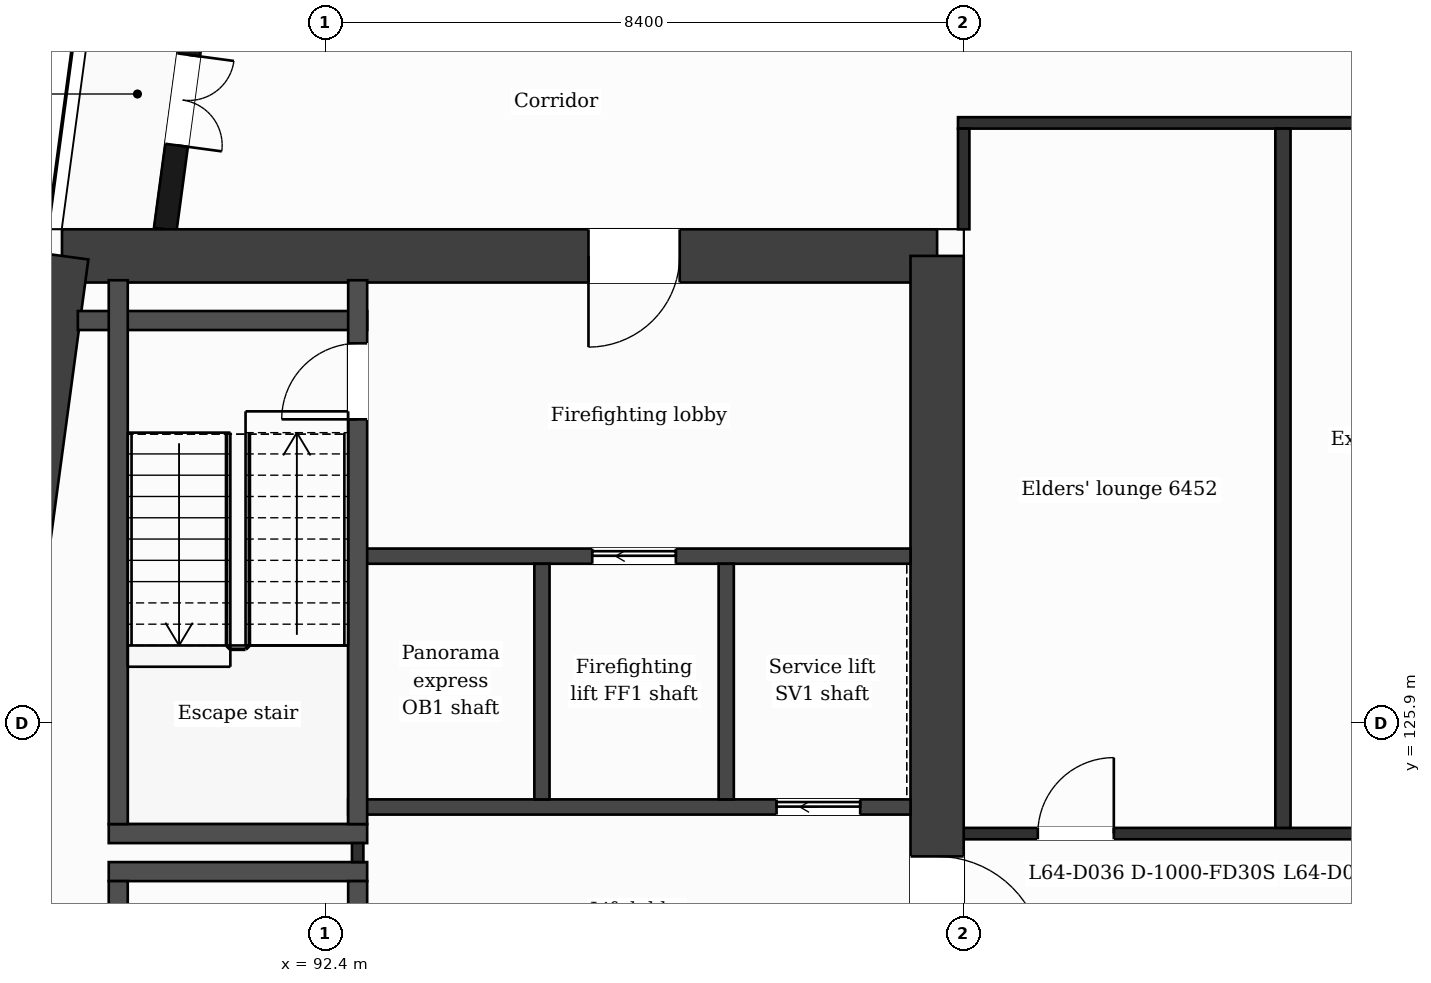
"""IFC4 building model, lengths in metres.
Left out: names, types, materials, properties, quantities, classifications, styles, units other than length and angle.
Written with IfcOpenShell. Run it as: python <this file> out.ifc"""

import sys

from ifc_helpers import new_model, si_unit, direction, frame, frame_2d, origin, place, context, subcontext, project, spatial, rectangle, extrude, element, fill, save


model = new_model("IFC4")
c1 = context("Model", 3, precision=1e-05, world=origin(), true_north=direction((0.0, 1.0)))
c2 = subcontext(c1, "Body", "Model", "MODEL_VIEW")
j1 = project(units=[si_unit("LENGTHUNIT", "METRE"), si_unit("PLANEANGLEUNIT", "RADIAN")], contexts=[c1])
p1 = place(None, origin())
s1 = spatial("IfcSite", under=j1, at=p1, CompositionType="ELEMENT")
p2 = place(p1, origin())
s2 = spatial("IfcBuilding", under=s1, at=p2, CompositionType="ELEMENT")
p3 = place(p2, frame((0.0, 0.0, 266.4)))
s3 = spatial("IfcBuildingStorey", under=s2, at=p3, CompositionType="ELEMENT", Elevation=266.4)
p4 = place(p3, frame((88.937, 132.05, 0.0), z_axis=(0.0, 0.0, 1.0), x_axis=(1.0, 0.0, 0.0)))
e1 = element("IfcWall", 1, at=p4, inside=s3, PredefinedType="SHEAR", context=c2, shape_type="SweptSolid", body=[
    extrude(rectangle(XDim=11.513, YDim=0.7, at=frame_2d((5.757, 0.0))), origin(), (0.0, 0.0, 1.0), 3.7),
])
p5 = place(p4, frame((6.927, 0.0, 0.0)))
e2 = element("IfcOpeningElement", 2, at=p5, cuts=e1, PredefinedType="OPENING", context=c2, shape_type="SweptSolid", body=[
    extrude(rectangle(XDim=1.2, YDim=2.1, at=frame_2d((0.6, 1.05))), frame((0.0, 0.36, 0.0), z_axis=(0.0, -1.0, 0.0), x_axis=(1.0, 0.0, 0.0)), (0.0, 0.0, 1.0), 0.72),
])
p6 = place(p3, frame((100.45, 132.05, 0.0), z_axis=(0.0, 0.0, 1.0), x_axis=(0.0, -1.0, 0.0)))
e3 = element("IfcWall", 3, at=p6, inside=s3, PredefinedType="SHEAR", context=c2, shape_type="SweptSolid", body=[
    extrude(rectangle(XDim=21.3, YDim=0.7, at=frame_2d((10.65, 0.0))), origin(), (0.0, 0.0, 1.0), 3.7),
])
p7 = place(p6, frame((7.9, 0.0, 0.0)))
e4 = element("IfcOpeningElement", 4, at=p7, cuts=e3, PredefinedType="OPENING", context=c2, shape_type="SweptSolid", body=[
    extrude(rectangle(XDim=1.4, YDim=2.1, at=frame_2d((0.7, 1.05))), frame((0.0, 0.36, 0.0), z_axis=(0.0, -1.0, 0.0), x_axis=(1.0, 0.0, 0.0)), (0.0, 0.0, 1.0), 0.72),
])
p8 = place(p3, frame((86.07, 110.75, 0.0), z_axis=(0.0, 0.0, 1.0), x_axis=(0.133406218907, 0.991061441464, 0.0)))
e5 = element("IfcWall", 5, at=p8, inside=s3, PredefinedType="SHEAR", context=c2, shape_type="SweptSolid", body=[
    extrude(rectangle(XDim=21.492, YDim=0.7, at=frame_2d((10.746, 0.0))), origin(), (0.0, 0.0, 1.0), 3.7),
])
p9 = place(p3, frame((91.177, 138.95, 0.0), z_axis=(0.0, 0.0, 1.0), x_axis=(-0.133426664613, -0.991058689065, 0.0)))
e6 = element("IfcWall", 6, at=p9, inside=s3, PredefinedType="SOLIDWALL", context=c2, shape_type="SweptSolid", body=[
    extrude(rectangle(XDim=6.609, YDim=0.3, at=frame_2d((3.305, 0.0))), origin(), (0.0, 0.0, 1.0), 3.38),
])
p10 = place(p9, frame((1.039, 0.0, 0.9)))
e7 = element("IfcOpeningElement", 7, at=p10, cuts=e6, PredefinedType="OPENING", context=c2, shape_type="SweptSolid", body=[
    extrude(rectangle(XDim=1.2, YDim=2.1, at=frame_2d((0.6, 1.05))), frame((0.0, 0.16, 0.0), z_axis=(0.0, -1.0, 0.0), x_axis=(1.0, 0.0, 0.0)), (0.0, 0.0, 1.0), 0.32),
])
p11 = place(p9, frame((4.294, 0.0, 0.0)))
e8 = element("IfcOpeningElement", 8, at=p11, cuts=e6, PredefinedType="OPENING", context=c2, shape_type="SweptSolid", body=[
    extrude(rectangle(XDim=1.2, YDim=2.4, at=frame_2d((0.6, 1.2))), frame((0.0, 0.16, 0.0), z_axis=(0.0, -1.0, 0.0), x_axis=(1.0, 0.0, 0.0)), (0.0, 0.0, 1.0), 0.32),
])
for number, where, z_axis, x_axis in (
    (9, (89.552, 123.95, 0.0), (0.0, 0.0, 1.0), (1.0, 0.0, 0.0)),
    (10, (89.552, 124.45, 0.0), (0.0, 0.0, 1.0), (1.0, 0.0, 0.0)),
):
    element("IfcWall", number, at=place(p3, frame(where, z_axis=z_axis, x_axis=x_axis)), inside=s3, PredefinedType="PARTITIONING", context=c2, shape_type="SweptSolid", body=[
        extrude(rectangle(XDim=3.4, YDim=0.25, at=frame_2d((1.7, 0.0))), origin(), (0.0, 0.0, 1.0), 3.38),
    ])
p12 = place(p3, frame((100.8, 124.45, 0.0), z_axis=(0.0, 0.0, 1.0), x_axis=(1.0, 0.0, 0.0)))
e11 = element("IfcWall", 11, at=p12, inside=s3, PredefinedType="PARTITIONING", context=c2, shape_type="SweptSolid", body=[
    extrude(rectangle(XDim=25.2, YDim=0.15, at=frame_2d((12.6, 0.0))), origin(), (0.0, 0.0, 1.0), 3.38),
])
p13 = place(p12, frame((0.975, 0.0, 0.0)))
e12 = element("IfcOpeningElement", 12, at=p13, cuts=e11, PredefinedType="OPENING", context=c2, shape_type="SweptSolid", body=[
    extrude(rectangle(XDim=1.0, YDim=2.1, at=frame_2d((0.5, 1.05))), frame((0.0, 0.085, 0.0), z_axis=(0.0, -1.0, 0.0), x_axis=(1.0, 0.0, 0.0)), (0.0, 0.0, 1.0), 0.17),
])
p14 = place(p12, frame((5.175, 0.0, 0.0)))
e13 = element("IfcOpeningElement", 13, at=p14, cuts=e11, PredefinedType="OPENING", context=c2, shape_type="SweptSolid", body=[
    extrude(rectangle(XDim=1.0, YDim=2.1, at=frame_2d((0.5, 1.05))), frame((0.0, 0.085, 0.0), z_axis=(0.0, -1.0, 0.0), x_axis=(1.0, 0.0, 0.0)), (0.0, 0.0, 1.0), 0.17),
])
p15 = place(p12, frame((13.775, 0.0, 0.0)))
e14 = element("IfcOpeningElement", 14, at=p15, cuts=e11, PredefinedType="OPENING", context=c2, shape_type="SweptSolid", body=[
    extrude(rectangle(XDim=1.0, YDim=2.1, at=frame_2d((0.5, 1.05))), frame((0.0, 0.085, 0.0), z_axis=(0.0, -1.0, 0.0), x_axis=(1.0, 0.0, 0.0)), (0.0, 0.0, 1.0), 0.17),
])
p16 = place(p12, frame((17.67, 0.0, 0.0)))
e15 = element("IfcOpeningElement", 15, at=p16, cuts=e11, PredefinedType="OPENING", context=c2, shape_type="SweptSolid", body=[
    extrude(rectangle(XDim=1.0, YDim=2.1, at=frame_2d((0.5, 1.05))), frame((0.0, 0.085, 0.0), z_axis=(0.0, -1.0, 0.0), x_axis=(1.0, 0.0, 0.0)), (0.0, 0.0, 1.0), 0.17),
])
p17 = place(p12, frame((23.225, 0.0, 0.0)))
e16 = element("IfcOpeningElement", 16, at=p17, cuts=e11, PredefinedType="OPENING", context=c2, shape_type="SweptSolid", body=[
    extrude(rectangle(XDim=1.0, YDim=2.1, at=frame_2d((0.5, 1.05))), frame((0.0, 0.085, 0.0), z_axis=(0.0, -1.0, 0.0), x_axis=(1.0, 0.0, 0.0)), (0.0, 0.0, 1.0), 0.17),
])
p18 = place(p3, frame((92.702, 124.8, 0.0), z_axis=(0.0, 0.0, 1.0), x_axis=(1.0, 0.0, 0.0)))
e17 = element("IfcWall", 17, at=p18, inside=s3, PredefinedType="PARTITIONING", context=c2, shape_type="SweptSolid", body=[
    extrude(rectangle(XDim=7.398, YDim=0.2, at=frame_2d((3.699, 0.0))), origin(), (0.0, 0.0, 1.0), 3.38),
])
p19 = place(p18, frame((5.636, 0.0, 0.0)))
e18 = element("IfcOpeningElement", 18, at=p19, cuts=e17, PredefinedType="OPENING", context=c2, shape_type="SweptSolid", body=[
    extrude(rectangle(XDim=1.1, YDim=2.1, at=frame_2d((0.55, 1.05))), frame((0.0, 0.11, 0.0), z_axis=(0.0, -1.0, 0.0), x_axis=(1.0, 0.0, 0.0)), (0.0, 0.0, 1.0), 0.22),
])
p20 = place(p3, frame((92.827, 128.1, 0.0), z_axis=(0.0, 0.0, 1.0), x_axis=(1.0, 0.0, 0.0)))
e19 = element("IfcWall", 19, at=p20, inside=s3, PredefinedType="PARTITIONING", context=c2, shape_type="SweptSolid", body=[
    extrude(rectangle(XDim=7.273, YDim=0.2, at=frame_2d((3.637, 0.0))), origin(), (0.0, 0.0, 1.0), 3.38),
])
p21 = place(p20, frame((3.086, 0.0, 0.0)))
e20 = element("IfcOpeningElement", 20, at=p21, cuts=e19, PredefinedType="OPENING", context=c2, shape_type="SweptSolid", body=[
    extrude(rectangle(XDim=1.1, YDim=2.1, at=frame_2d((0.55, 1.05))), frame((0.0, 0.11, 0.0), z_axis=(0.0, -1.0, 0.0), x_axis=(1.0, 0.0, 0.0)), (0.0, 0.0, 1.0), 0.22),
])
p22 = place(p3, frame((89.146, 131.2, 0.0), z_axis=(0.0, 0.0, 1.0), x_axis=(1.0, 0.0, 0.0)))
e21 = element("IfcWall", 21, at=p22, inside=s3, PredefinedType="PARTITIONING", context=c2, shape_type="SweptSolid", body=[
    extrude(rectangle(XDim=3.806, YDim=0.25, at=frame_2d((1.903, 0.0))), origin(), (0.0, 0.0, 1.0), 3.38),
])
p23 = place(p3, frame((100.725, 133.8, 0.0), z_axis=(0.0, 0.0, 1.0), x_axis=(1.0, 0.0, 0.0)))
e22 = element("IfcWall", 22, at=p23, inside=s3, PredefinedType="PARTITIONING", context=c2, shape_type="SweptSolid", body=[
    extrude(rectangle(XDim=25.35, YDim=0.15, at=frame_2d((12.675, 0.0))), origin(), (0.0, 0.0, 1.0), 3.38),
])
p24 = place(p23, frame((19.1, 0.0, 0.0)))
e23 = element("IfcOpeningElement", 23, at=p24, cuts=e22, PredefinedType="OPENING", context=c2, shape_type="SweptSolid", body=[
    extrude(rectangle(XDim=1.0, YDim=2.1, at=frame_2d((0.5, 1.05))), frame((0.0, 0.085, 0.0), z_axis=(0.0, -1.0, 0.0), x_axis=(1.0, 0.0, 0.0)), (0.0, 0.0, 1.0), 0.17),
])
for number, where, z_axis, x_axis in (
    (24, (89.677, 116.67, 0.0), (0.0, 0.0, 1.0), (0.0, 1.0, 0.0)),
    (25, (89.677, 124.575, 0.0), (0.0, 0.0, 1.0), (0.0, 1.0, 0.0)),
):
    element("IfcWall", number, at=place(p3, frame(where, z_axis=z_axis, x_axis=x_axis)), inside=s3, PredefinedType="PARTITIONING", context=c2, shape_type="SweptSolid", body=[
        extrude(rectangle(XDim=7.155, YDim=0.25, at=frame_2d((3.578, 0.0))), origin(), (0.0, 0.0, 1.0), 3.38),
    ])
p25 = place(p3, frame((92.827, 124.075, 0.0), z_axis=(0.0, 0.0, 1.0), x_axis=(0.0, 1.0, 0.0)))
e26 = element("IfcWall", 26, at=p25, inside=s3, PredefinedType="PARTITIONING", context=c2, shape_type="SweptSolid", body=[
    extrude(rectangle(XDim=0.25, YDim=0.15, at=frame_2d((0.125, 0.0))), origin(), (0.0, 0.0, 1.0), 3.38),
])
p26 = place(p3, frame((92.827, 116.67, 0.0), z_axis=(0.0, 0.0, 1.0), x_axis=(0.0, 1.0, 0.0)))
e27 = element("IfcWall", 27, at=p26, inside=s3, PredefinedType="PARTITIONING", context=c2, shape_type="SweptSolid", body=[
    extrude(rectangle(XDim=7.155, YDim=0.25, at=frame_2d((3.578, 0.0))), origin(), (0.0, 0.0, 1.0), 3.38),
])
p27 = place(p26, frame((5.855, 0.0, 0.0)))
e28 = element("IfcOpeningElement", 28, at=p27, cuts=e27, PredefinedType="OPENING", context=c2, shape_type="SweptSolid", body=[
    extrude(rectangle(XDim=0.95, YDim=2.1, at=frame_2d((0.475, 1.05))), frame((0.0, 0.135, 0.0), z_axis=(0.0, -1.0, 0.0), x_axis=(1.0, 0.0, 0.0)), (0.0, 0.0, 1.0), 0.27),
])
p28 = place(p3, frame((92.827, 124.575, 0.0), z_axis=(0.0, 0.0, 1.0), x_axis=(0.0, 1.0, 0.0)))
e29 = element("IfcWall", 29, at=p28, inside=s3, PredefinedType="PARTITIONING", context=c2, shape_type="SweptSolid", body=[
    extrude(rectangle(XDim=7.155, YDim=0.25, at=frame_2d((3.578, 0.0))), origin(), (0.0, 0.0, 1.0), 3.38),
])
p29 = place(p28, frame((5.325, 0.0, 0.0)))
e30 = element("IfcOpeningElement", 30, at=p29, cuts=e29, PredefinedType="OPENING", context=c2, shape_type="SweptSolid", body=[
    extrude(rectangle(XDim=1.0, YDim=2.1, at=frame_2d((0.5, 1.05))), frame((0.0, 0.135, 0.0), z_axis=(0.0, -1.0, 0.0), x_axis=(1.0, 0.0, 0.0)), (0.0, 0.0, 1.0), 0.27),
])
for number, where, z_axis, x_axis in (
    (31, (95.251, 124.9, 0.0), (0.0, 0.0, 1.0), (0.0, 1.0, 0.0)),
    (32, (97.676, 124.9, 0.0), (0.0, 0.0, 1.0), (0.0, 1.0, 0.0)),
):
    element("IfcWall", number, at=place(p3, frame(where, z_axis=z_axis, x_axis=x_axis)), inside=s3, PredefinedType="PARTITIONING", context=c2, shape_type="SweptSolid", body=[
        extrude(rectangle(XDim=3.1, YDim=0.2, at=frame_2d((1.55, 0.0))), origin(), (0.0, 0.0, 1.0), 3.38),
    ])
p30 = place(p3, frame((100.8, 132.4, 0.0), z_axis=(0.0, 0.0, 1.0), x_axis=(0.0, 1.0, 0.0)))
e33 = element("IfcWall", 33, at=p30, inside=s3, PredefinedType="PARTITIONING", context=c2, shape_type="SweptSolid", body=[
    extrude(rectangle(XDim=1.325, YDim=0.15, at=frame_2d((0.663, 0.0))), origin(), (0.0, 0.0, 1.0), 3.38),
])
p31 = place(p3, frame((105.0, 124.525, 0.0), z_axis=(0.0, 0.0, 1.0), x_axis=(0.0, 1.0, 0.0)))
e34 = element("IfcWall", 34, at=p31, inside=s3, PredefinedType="PARTITIONING", context=c2, shape_type="SweptSolid", body=[
    extrude(rectangle(XDim=9.2, YDim=0.2, at=frame_2d((4.6, 0.0))), origin(), (0.0, 0.0, 1.0), 3.38),
])
p32 = place(p11, origin())
e35 = element("IfcDoor", 35, at=p32, inside=s3, OperationType="DOUBLE_DOOR_SINGLE_SWING", PredefinedType="DOOR", context=c2, shape_type="SweptSolid", body=[
    extrude(rectangle(XDim=1.2, YDim=2.4, at=frame_2d((0.6, 1.2))), frame((0.0, 0.025, 0.0), z_axis=(0.0, -1.0, 0.0), x_axis=(1.0, 0.0, 0.0)), (0.0, 0.0, 1.0), 0.05),
])
fill(e8, e35)
p33 = place(p21, origin())
e36 = element("IfcDoor", 36, at=p33, inside=s3, OperationType="SLIDING_TO_LEFT", PredefinedType="DOOR", context=c2, shape_type="SweptSolid", body=[
    extrude(rectangle(XDim=1.1, YDim=2.1, at=frame_2d((0.55, 1.05))), frame((0.0, 0.025, 0.0), z_axis=(0.0, -1.0, 0.0), x_axis=(1.0, 0.0, 0.0)), (0.0, 0.0, 1.0), 0.05),
])
fill(e20, e36)
p34 = place(p19, origin())
e37 = element("IfcDoor", 37, at=p34, inside=s3, OperationType="SLIDING_TO_LEFT", PredefinedType="DOOR", context=c2, shape_type="SweptSolid", body=[
    extrude(rectangle(XDim=1.1, YDim=2.1, at=frame_2d((0.55, 1.05))), frame((0.0, 0.025, 0.0), z_axis=(0.0, -1.0, 0.0), x_axis=(1.0, 0.0, 0.0)), (0.0, 0.0, 1.0), 0.05),
])
fill(e18, e37)
p35 = place(p29, origin())
e38 = element("IfcDoor", 38, at=p35, inside=s3, OperationType="SINGLE_SWING_LEFT", PredefinedType="DOOR", context=c2, shape_type="SweptSolid", body=[
    extrude(rectangle(XDim=1.0, YDim=2.1, at=frame_2d((0.5, 1.05))), frame((0.0, 0.025, 0.0), z_axis=(0.0, -1.0, 0.0), x_axis=(1.0, 0.0, 0.0)), (0.0, 0.0, 1.0), 0.05),
])
fill(e30, e38)
p36 = place(p13, origin())
e39 = element("IfcDoor", 39, at=p36, inside=s3, OperationType="SINGLE_SWING_RIGHT", PredefinedType="DOOR", context=c2, shape_type="SweptSolid", body=[
    extrude(rectangle(XDim=1.0, YDim=2.1, at=frame_2d((0.5, 1.05))), frame((0.0, 0.025, 0.0), z_axis=(0.0, -1.0, 0.0), x_axis=(1.0, 0.0, 0.0)), (0.0, 0.0, 1.0), 0.05),
])
fill(e12, e39)
p37 = place(p5, origin())
e40 = element("IfcDoor", 40, at=p37, inside=s3, OperationType="SINGLE_SWING_LEFT", PredefinedType="DOOR", context=c2, shape_type="SweptSolid", body=[
    extrude(rectangle(XDim=1.2, YDim=2.1, at=frame_2d((0.6, 1.05))), frame((0.0, 0.025, 0.0), z_axis=(0.0, -1.0, 0.0), x_axis=(1.0, 0.0, 0.0)), (0.0, 0.0, 1.0), 0.05),
])
fill(e2, e40)
p38 = place(p7, origin())
e41 = element("IfcDoor", 41, at=p38, inside=s3, OperationType="SINGLE_SWING_RIGHT", PredefinedType="DOOR", context=c2, shape_type="SweptSolid", body=[
    extrude(rectangle(XDim=1.4, YDim=2.1, at=frame_2d((0.7, 1.05))), frame((0.0, 0.025, 0.0), z_axis=(0.0, -1.0, 0.0), x_axis=(1.0, 0.0, 0.0)), (0.0, 0.0, 1.0), 0.05),
])
fill(e4, e41)
save(model, sys.argv[1])
